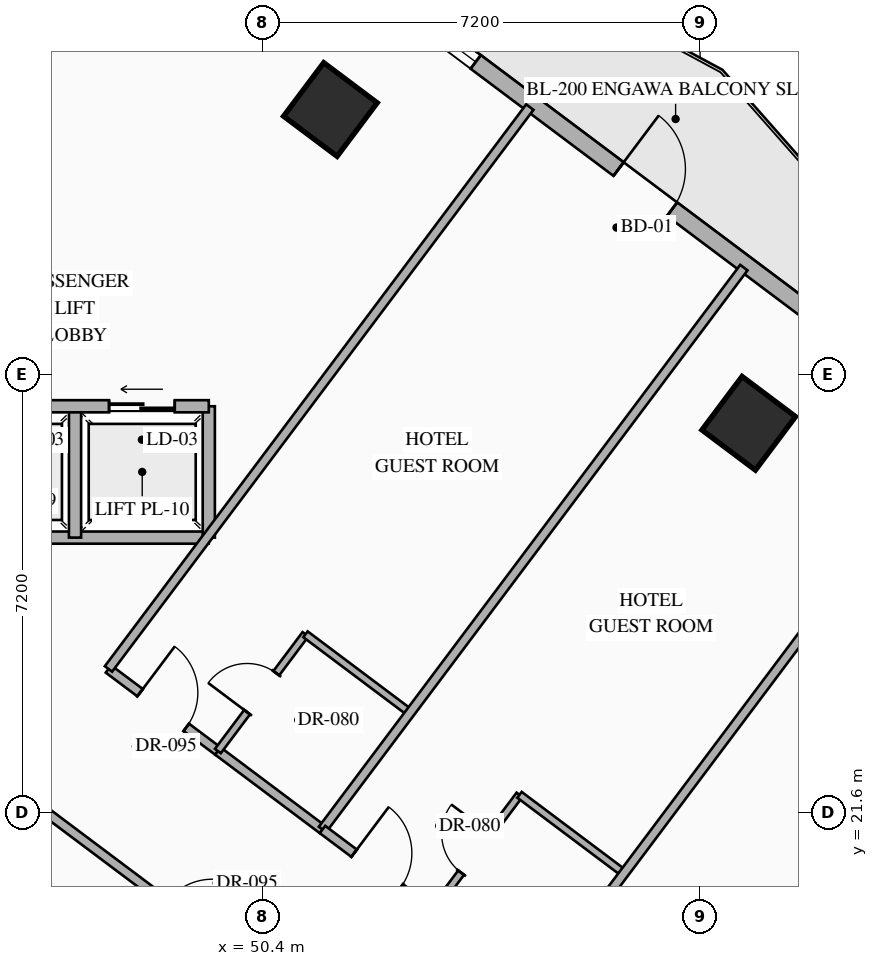
"""IFC4 building model, lengths in metres.
Left out: names, types, materials, properties, quantities, classifications, styles, units other than length and angle.
Written with IfcOpenShell. Run it as: python <this file> out.ifc"""

import sys

from ifc_helpers import new_model, si_unit, direction, frame, frame_2d, origin, origin_2d, place, context, subcontext, project, spatial, rectangle, hollow_rectangle, extrude, element, fill, save


model = new_model("IFC4")
c1 = context("Model", 3, precision=1e-05, world=origin(), true_north=direction((0.0, 1.0)))
c2 = subcontext(c1, "Body", "Model", "MODEL_VIEW")
j1 = project(units=[si_unit("LENGTHUNIT", "METRE"), si_unit("PLANEANGLEUNIT", "RADIAN")], contexts=[c1])
p1 = place(None, origin())
s1 = spatial("IfcSite", under=j1, at=p1, CompositionType="ELEMENT")
p2 = place(p1, origin())
s2 = spatial("IfcBuilding", under=s1, at=p2, CompositionType="ELEMENT")
p3 = place(p2, frame((0.0, 0.0, 60.05)))
s3 = spatial("IfcBuildingStorey", under=s2, at=p3, CompositionType="ELEMENT", Elevation=60.05)
for number, where, z_axis, x_axis in (
    (1, (51.52, 33.16, 0.0), (0.0, 0.0, 1.0), (0.8, -0.6, 0.0)),
    (2, (58.4, 28.0, 0.0), (0.0, 0.0, 1.0), (0.8, -0.6, 0.0)),
):
    element("IfcColumn", number, at=place(p3, frame(where, z_axis=z_axis, x_axis=x_axis)), inside=s3, PredefinedType="COLUMN", context=c2, shape_type="SweptSolid", body=[
        extrude(hollow_rectangle(XDim=1.1, YDim=1.1, WallThickness=0.04, at=origin_2d()), origin(), (0.0, 0.0, 1.0), 3.35),
    ])
p4 = place(p3, frame((44.86, 40.73, 0.0), z_axis=(0.0, 0.0, 1.0), x_axis=(0.800006902154, -0.599990797017, 0.0)))
e3 = element("IfcWall", 3, at=p4, inside=s3, PredefinedType="STANDARD", context=c2, shape_type="SweptSolid", body=[
    extrude(rectangle(XDim=29.712, YDim=0.28, at=frame_2d((14.856, 0.0))), origin(), (0.0, 0.0, 1.0), 3.13),
])
p5 = place(p4, frame((14.249, 0.0, 0.0)))
e4 = element("IfcOpeningElement", 4, at=p5, cuts=e3, PredefinedType="OPENING", context=c2, shape_type="SweptSolid", body=[
    extrude(rectangle(XDim=1.1, YDim=2.2, at=frame_2d((0.55, 1.1))), frame((0.0, 0.15, 0.0), z_axis=(0.0, -1.0, 0.0), x_axis=(1.0, 0.0, 0.0)), (0.0, 0.0, 1.0), 0.3),
])
p6 = place(p4, frame((1.612, 0.0, 0.85)))
e5 = element("IfcOpeningElement", 5, at=p6, cuts=e3, PredefinedType="OPENING", context=c2, shape_type="SweptSolid", body=[
    extrude(rectangle(XDim=1.4, YDim=1.8, at=frame_2d((0.7, 0.9))), frame((0.0, 0.15, 0.0), z_axis=(0.0, -1.0, 0.0), x_axis=(1.0, 0.0, 0.0)), (0.0, 0.0, 1.0), 0.3),
])
p7 = place(p4, frame((5.667, 0.0, 0.85)))
e6 = element("IfcOpeningElement", 6, at=p7, cuts=e3, PredefinedType="OPENING", context=c2, shape_type="SweptSolid", body=[
    extrude(rectangle(XDim=1.4, YDim=1.8, at=frame_2d((0.7, 0.9))), frame((0.0, 0.15, 0.0), z_axis=(0.0, -1.0, 0.0), x_axis=(1.0, 0.0, 0.0)), (0.0, 0.0, 1.0), 0.3),
])
p8 = place(p4, frame((9.912, 0.0, 0.85)))
e7 = element("IfcOpeningElement", 7, at=p8, cuts=e3, PredefinedType="OPENING", context=c2, shape_type="SweptSolid", body=[
    extrude(rectangle(XDim=1.4, YDim=1.8, at=frame_2d((0.7, 0.9))), frame((0.0, 0.15, 0.0), z_axis=(0.0, -1.0, 0.0), x_axis=(1.0, 0.0, 0.0)), (0.0, 0.0, 1.0), 0.3),
])
p9 = place(p4, frame((18.803, 0.0, 0.85)))
e8 = element("IfcOpeningElement", 8, at=p9, cuts=e3, PredefinedType="OPENING", context=c2, shape_type="SweptSolid", body=[
    extrude(rectangle(XDim=1.4, YDim=1.8, at=frame_2d((0.7, 0.9))), frame((0.0, 0.15, 0.0), z_axis=(0.0, -1.0, 0.0), x_axis=(1.0, 0.0, 0.0)), (0.0, 0.0, 1.0), 0.3),
])
p10 = place(p4, frame((22.645, 0.0, 0.85)))
e9 = element("IfcOpeningElement", 9, at=p10, cuts=e3, PredefinedType="OPENING", context=c2, shape_type="SweptSolid", body=[
    extrude(rectangle(XDim=1.4, YDim=1.8, at=frame_2d((0.7, 0.9))), frame((0.0, 0.15, 0.0), z_axis=(0.0, -1.0, 0.0), x_axis=(1.0, 0.0, 0.0)), (0.0, 0.0, 1.0), 0.3),
])
p11 = place(p4, frame((27.668, 0.0, 0.85)))
e10 = element("IfcOpeningElement", 10, at=p11, cuts=e3, PredefinedType="OPENING", context=c2, shape_type="SweptSolid", body=[
    extrude(rectangle(XDim=1.4, YDim=1.8, at=frame_2d((0.7, 0.9))), frame((0.0, 0.15, 0.0), z_axis=(0.0, -1.0, 0.0), x_axis=(1.0, 0.0, 0.0)), (0.0, 0.0, 1.0), 0.3),
])
p12 = place(p3, frame((53.318, 2.487, 0.0), z_axis=(0.0, 0.0, 1.0), x_axis=(-0.800004174678, 0.599994433723, 0.0)))
e11 = element("IfcWall", 11, at=p12, inside=s3, PredefinedType="STANDARD", context=c2, shape_type="SweptSolid", body=[
    extrude(rectangle(XDim=35.089, YDim=0.28, at=frame_2d((17.544, 0.0))), origin(), (0.0, 0.0, 1.0), 3.13),
])
p13 = place(p12, frame((1.931, 0.0, 0.85)))
e12 = element("IfcOpeningElement", 12, at=p13, cuts=e11, PredefinedType="OPENING", context=c2, shape_type="SweptSolid", body=[
    extrude(rectangle(XDim=1.4, YDim=1.8, at=frame_2d((0.7, 0.9))), frame((0.0, 0.15, 0.0), z_axis=(0.0, -1.0, 0.0), x_axis=(1.0, 0.0, 0.0)), (0.0, 0.0, 1.0), 0.3),
])
p14 = place(p12, frame((6.819, 0.0, 0.85)))
e13 = element("IfcOpeningElement", 13, at=p14, cuts=e11, PredefinedType="OPENING", context=c2, shape_type="SweptSolid", body=[
    extrude(rectangle(XDim=1.4, YDim=1.8, at=frame_2d((0.7, 0.9))), frame((0.0, 0.15, 0.0), z_axis=(0.0, -1.0, 0.0), x_axis=(1.0, 0.0, 0.0)), (0.0, 0.0, 1.0), 0.3),
])
p15 = place(p12, frame((11.832, 0.0, 0.85)))
e14 = element("IfcOpeningElement", 14, at=p15, cuts=e11, PredefinedType="OPENING", context=c2, shape_type="SweptSolid", body=[
    extrude(rectangle(XDim=1.4, YDim=1.8, at=frame_2d((0.7, 0.9))), frame((0.0, 0.15, 0.0), z_axis=(0.0, -1.0, 0.0), x_axis=(1.0, 0.0, 0.0)), (0.0, 0.0, 1.0), 0.3),
])
p16 = place(p12, frame((17.647, 0.0, 0.85)))
e15 = element("IfcOpeningElement", 15, at=p16, cuts=e11, PredefinedType="OPENING", context=c2, shape_type="SweptSolid", body=[
    extrude(rectangle(XDim=1.4, YDim=1.8, at=frame_2d((0.7, 0.9))), frame((0.0, 0.15, 0.0), z_axis=(0.0, -1.0, 0.0), x_axis=(1.0, 0.0, 0.0)), (0.0, 0.0, 1.0), 0.3),
])
p17 = place(p12, frame((21.857, 0.0, 0.85)))
e16 = element("IfcOpeningElement", 16, at=p17, cuts=e11, PredefinedType="OPENING", context=c2, shape_type="SweptSolid", body=[
    extrude(rectangle(XDim=1.4, YDim=1.8, at=frame_2d((0.7, 0.9))), frame((0.0, 0.15, 0.0), z_axis=(0.0, -1.0, 0.0), x_axis=(1.0, 0.0, 0.0)), (0.0, 0.0, 1.0), 0.3),
])
p18 = place(p12, frame((26.87, 0.0, 0.85)))
e17 = element("IfcOpeningElement", 17, at=p18, cuts=e11, PredefinedType="OPENING", context=c2, shape_type="SweptSolid", body=[
    extrude(rectangle(XDim=1.4, YDim=1.8, at=frame_2d((0.7, 0.9))), frame((0.0, 0.15, 0.0), z_axis=(0.0, -1.0, 0.0), x_axis=(1.0, 0.0, 0.0)), (0.0, 0.0, 1.0), 0.3),
])
p19 = place(p12, frame((31.757, 0.0, 0.85)))
e18 = element("IfcOpeningElement", 18, at=p19, cuts=e11, PredefinedType="OPENING", context=c2, shape_type="SweptSolid", body=[
    extrude(rectangle(XDim=1.4, YDim=1.8, at=frame_2d((0.7, 0.9))), frame((0.0, 0.15, 0.0), z_axis=(0.0, -1.0, 0.0), x_axis=(1.0, 0.0, 0.0)), (0.0, 0.0, 1.0), 0.3),
])
p20 = place(p3, frame((45.12, 26.12, 0.0), z_axis=(0.0, 0.0, 1.0), x_axis=(1.0, 0.0, 0.0)))
e19 = element("IfcWall", 19, at=p20, inside=s3, PredefinedType="STANDARD", context=c2, shape_type="SweptSolid", body=[
    extrude(rectangle(XDim=4.4, YDim=0.2, at=frame_2d((2.2, 0.0))), origin(), (0.0, 0.0, 1.0), 3.13),
])
for number, where, z_axis, x_axis in (
    (20, (49.52, 26.12, 0.0), (0.0, 0.0, 1.0), (0.0, 1.0, 0.0)),
    (21, (47.32, 26.12, 0.0), (0.0, 0.0, 1.0), (0.0, 1.0, 0.0)),
):
    element("IfcWall", number, at=place(p3, frame(where, z_axis=z_axis, x_axis=x_axis)), inside=s3, PredefinedType="STANDARD", context=c2, shape_type="SweptSolid", body=[
        extrude(rectangle(XDim=2.16, YDim=0.2, at=frame_2d((1.08, 0.0))), origin(), (0.0, 0.0, 1.0), 3.13),
    ])
p21 = place(p3, frame((45.12, 28.28, 0.0), z_axis=(0.0, 0.0, 1.0), x_axis=(1.0, 0.0, 0.0)))
e22 = element("IfcWall", 22, at=p21, inside=s3, PredefinedType="STANDARD", context=c2, shape_type="SweptSolid", body=[
    extrude(rectangle(XDim=4.4, YDim=0.2, at=frame_2d((2.2, 0.0))), origin(), (0.0, 0.0, 1.0), 3.13),
])
p22 = place(p21, frame((0.56, 0.0, 0.0)))
e23 = element("IfcOpeningElement", 23, at=p22, cuts=e22, PredefinedType="OPENING", context=c2, shape_type="SweptSolid", body=[
    extrude(rectangle(XDim=1.08, YDim=2.15, at=frame_2d((0.54, 1.075))), frame((0.0, 0.11, 0.0), z_axis=(0.0, -1.0, 0.0), x_axis=(1.0, 0.0, 0.0)), (0.0, 0.0, 1.0), 0.22),
])
p23 = place(p21, frame((2.76, 0.0, 0.0)))
e24 = element("IfcOpeningElement", 24, at=p23, cuts=e22, PredefinedType="OPENING", context=c2, shape_type="SweptSolid", body=[
    extrude(rectangle(XDim=1.08, YDim=2.15, at=frame_2d((0.54, 1.075))), frame((0.0, 0.11, 0.0), z_axis=(0.0, -1.0, 0.0), x_axis=(1.0, 0.0, 0.0)), (0.0, 0.0, 1.0), 0.22),
])
p24 = place(p3, frame((47.87, 23.96, 0.0), z_axis=(0.0, 0.0, 1.0), x_axis=(0.8, -0.6, 0.0)))
e25 = element("IfcWall", 25, at=p24, inside=s3, PredefinedType="PARTITIONING", context=c2, shape_type="SweptSolid", body=[
    extrude(rectangle(XDim=2.25, YDim=0.15, at=frame_2d((1.125, 0.0))), origin(), (0.0, 0.0, 1.0), 2.775),
])
p25 = place(p24, frame((0.65, 0.0, 0.0)))
e26 = element("IfcOpeningElement", 26, at=p25, cuts=e25, PredefinedType="OPENING", context=c2, shape_type="SweptSolid", body=[
    extrude(rectangle(XDim=0.95, YDim=2.15, at=frame_2d((0.475, 1.075))), frame((0.0, 0.085, 0.0), z_axis=(0.0, -1.0, 0.0), x_axis=(1.0, 0.0, 0.0)), (0.0, 0.0, 1.0), 0.17),
])
p26 = place(p3, frame((49.67, 22.61, 0.0), z_axis=(0.0, 0.0, 1.0), x_axis=(0.79998637334, -0.60001816845, 0.0)))
e27 = element("IfcWall", 27, at=p26, inside=s3, PredefinedType="PARTITIONING", context=c2, shape_type="SweptSolid", body=[
    extrude(rectangle(XDim=2.15, YDim=0.15, at=frame_2d((1.075, 0.0))), origin(), (0.0, 0.0, 1.0), 2.775),
])
p27 = place(p3, frame((49.67, 22.61, 0.0), z_axis=(0.0, 0.0, 1.0), x_axis=(0.600065100855, 0.79995117022, 0.0)))
e28 = element("IfcWall", 28, at=p27, inside=s3, PredefinedType="PARTITIONING", context=c2, shape_type="SweptSolid", body=[
    extrude(rectangle(XDim=2.4, YDim=0.12, at=frame_2d((1.2, 0.0))), origin(), (0.0, 0.0, 1.0), 3.13),
])
p28 = place(p27, frame((0.8, 0.0, 0.0)))
e29 = element("IfcOpeningElement", 29, at=p28, cuts=e28, PredefinedType="OPENING", context=c2, shape_type="SweptSolid", body=[
    extrude(rectangle(XDim=0.8, YDim=2.06, at=frame_2d((0.4, 1.03))), frame((0.0, 0.07, 0.0), z_axis=(0.0, -1.0, 0.0), x_axis=(1.0, 0.0, 0.0)), (0.0, 0.0, 1.0), 0.14),
])
p29 = place(p3, frame((51.11, 24.53, 0.0), z_axis=(0.0, 0.0, 1.0), x_axis=(0.79998637334, -0.60001816845, 0.0)))
e30 = element("IfcWall", 30, at=p29, inside=s3, PredefinedType="PARTITIONING", context=c2, shape_type="SweptSolid", body=[
    extrude(rectangle(XDim=2.15, YDim=0.12, at=frame_2d((1.075, 0.0))), origin(), (0.0, 0.0, 1.0), 3.13),
])
for number, where, z_axis, x_axis in (
    (31, (47.87, 23.96, 0.0), (0.0, 0.0, 1.0), (0.6, 0.8, 0.0)),
    (32, (51.39, 21.32, 0.0), (0.0, 0.0, 1.0), (0.6, 0.8, 0.0)),
):
    element("IfcWall", number, at=place(p3, frame(where, z_axis=z_axis, x_axis=x_axis)), inside=s3, PredefinedType="PARTITIONING", context=c2, shape_type="SweptSolid", body=[
        extrude(rectangle(XDim=11.55, YDim=0.15, at=frame_2d((5.775, 0.0))), origin(), (0.0, 0.0, 1.0), 3.13),
    ])
p30 = place(p3, frame((51.39, 21.32, 0.0), z_axis=(0.0, 0.0, 1.0), x_axis=(0.799986979543, -0.600017360216, 0.0)))
e33 = element("IfcWall", 33, at=p30, inside=s3, PredefinedType="PARTITIONING", context=c2, shape_type="SweptSolid", body=[
    extrude(rectangle(XDim=2.25, YDim=0.15, at=frame_2d((1.125, 0.0))), origin(), (0.0, 0.0, 1.0), 2.775),
])
p31 = place(p30, frame((0.65, 0.0, 0.0)))
e34 = element("IfcOpeningElement", 34, at=p31, cuts=e33, PredefinedType="OPENING", context=c2, shape_type="SweptSolid", body=[
    extrude(rectangle(XDim=0.95, YDim=2.15, at=frame_2d((0.475, 1.075))), frame((0.0, 0.085, 0.0), z_axis=(0.0, -1.0, 0.0), x_axis=(1.0, 0.0, 0.0)), (0.0, 0.0, 1.0), 0.17),
])
p32 = place(p3, frame((53.19, 19.97, 0.0), z_axis=(0.0, 0.0, 1.0), x_axis=(0.6, 0.8, 0.0)))
e35 = element("IfcWall", 35, at=p32, inside=s3, PredefinedType="PARTITIONING", context=c2, shape_type="SweptSolid", body=[
    extrude(rectangle(XDim=2.4, YDim=0.12, at=frame_2d((1.2, 0.0))), origin(), (0.0, 0.0, 1.0), 3.13),
])
p33 = place(p32, frame((0.8, 0.0, 0.0)))
e36 = element("IfcOpeningElement", 36, at=p33, cuts=e35, PredefinedType="OPENING", context=c2, shape_type="SweptSolid", body=[
    extrude(rectangle(XDim=0.8, YDim=2.06, at=frame_2d((0.4, 1.03))), frame((0.0, 0.07, 0.0), z_axis=(0.0, -1.0, 0.0), x_axis=(1.0, 0.0, 0.0)), (0.0, 0.0, 1.0), 0.14),
])
p34 = place(p3, frame((54.63, 21.89, 0.0), z_axis=(0.0, 0.0, 1.0), x_axis=(0.800081749437, -0.599890985279, 0.0)))
e37 = element("IfcWall", 37, at=p34, inside=s3, PredefinedType="PARTITIONING", context=c2, shape_type="SweptSolid", body=[
    extrude(rectangle(XDim=2.15, YDim=0.12, at=frame_2d((1.075, 0.0))), origin(), (0.0, 0.0, 1.0), 3.13),
])
for number, where, z_axis, x_axis in (
    (38, (54.91, 18.68, 0.0), (0.0, 0.0, 1.0), (0.6, 0.8, 0.0)),
    (39, (59.07, 15.56, 0.0), (0.0, 0.0, 1.0), (0.6, 0.8, 0.0)),
):
    element("IfcWall", number, at=place(p3, frame(where, z_axis=z_axis, x_axis=x_axis)), inside=s3, PredefinedType="PARTITIONING", context=c2, shape_type="SweptSolid", body=[
        extrude(rectangle(XDim=11.55, YDim=0.15, at=frame_2d((5.775, 0.0))), origin(), (0.0, 0.0, 1.0), 3.13),
    ])
p35 = place(p3, frame((46.37, 21.96, 0.0), z_axis=(0.0, 0.0, 1.0), x_axis=(0.799997249048, -0.600003667918, 0.0)))
e40 = element("IfcWall", 40, at=p35, inside=s3, PredefinedType="PARTITIONING", context=c2, shape_type="SweptSolid", body=[
    extrude(rectangle(XDim=10.65, YDim=0.15, at=frame_2d((5.325, 0.0))), origin(), (0.0, 0.0, 1.0), 2.425),
])
p36 = place(p35, frame((3.062, 0.0, 0.0)))
e41 = element("IfcOpeningElement", 41, at=p36, cuts=e40, PredefinedType="OPENING", context=c2, shape_type="SweptSolid", body=[
    extrude(rectangle(XDim=0.95, YDim=2.15, at=frame_2d((0.475, 1.075))), frame((0.0, 0.085, 0.0), z_axis=(0.0, -1.0, 0.0), x_axis=(1.0, 0.0, 0.0)), (0.0, 0.0, 1.0), 0.17),
])
p37 = place(p5, origin())
e42 = element("IfcDoor", 42, at=p37, inside=s3, OperationType="SINGLE_SWING_LEFT", PredefinedType="DOOR", context=c2, shape_type="SweptSolid", body=[
    extrude(rectangle(XDim=1.1, YDim=2.2, at=frame_2d((0.55, 1.1))), frame((0.0, 0.025, 0.0), z_axis=(0.0, -1.0, 0.0), x_axis=(1.0, 0.0, 0.0)), (0.0, 0.0, 1.0), 0.05),
])
fill(e4, e42)
p38 = place(p8, origin())
e43 = element("IfcWindow", 43, at=p38, inside=s3, PartitioningType="SINGLE_PANEL", PredefinedType="WINDOW", context=c2, shape_type="SweptSolid", body=[
    extrude(rectangle(XDim=1.4, YDim=1.8, at=frame_2d((0.7, 0.9))), frame((0.0, 0.03, 0.0), z_axis=(0.0, -1.0, 0.0), x_axis=(1.0, 0.0, 0.0)), (0.0, 0.0, 1.0), 0.06),
])
fill(e7, e43)
p39 = place(p23, origin())
e44 = element("IfcDoor", 44, at=p39, inside=s3, OperationType="SLIDING_TO_LEFT", PredefinedType="USERDEFINED", context=c2, shape_type="SweptSolid", body=[
    extrude(rectangle(XDim=1.08, YDim=2.15, at=frame_2d((0.54, 1.075))), frame((0.0, 0.025, 0.0), z_axis=(0.0, -1.0, 0.0), x_axis=(1.0, 0.0, 0.0)), (0.0, 0.0, 1.0), 0.05),
])
fill(e24, e44)
p40 = place(p25, origin())
e45 = element("IfcDoor", 45, at=p40, inside=s3, OperationType="SINGLE_SWING_LEFT", PredefinedType="DOOR", context=c2, shape_type="SweptSolid", body=[
    extrude(rectangle(XDim=0.95, YDim=2.15, at=frame_2d((0.475, 1.075))), frame((0.0, 0.025, 0.0), z_axis=(0.0, -1.0, 0.0), x_axis=(1.0, 0.0, 0.0)), (0.0, 0.0, 1.0), 0.05),
])
fill(e26, e45)
p41 = place(p28, origin())
e46 = element("IfcDoor", 46, at=p41, inside=s3, OperationType="SINGLE_SWING_LEFT", PredefinedType="DOOR", context=c2, shape_type="SweptSolid", body=[
    extrude(rectangle(XDim=0.8, YDim=2.06, at=frame_2d((0.4, 1.03))), frame((0.0, 0.025, 0.0), z_axis=(0.0, -1.0, 0.0), x_axis=(1.0, 0.0, 0.0)), (0.0, 0.0, 1.0), 0.05),
])
fill(e29, e46)
p42 = place(p31, origin())
e47 = element("IfcDoor", 47, at=p42, inside=s3, OperationType="SINGLE_SWING_LEFT", PredefinedType="DOOR", context=c2, shape_type="SweptSolid", body=[
    extrude(rectangle(XDim=0.95, YDim=2.15, at=frame_2d((0.475, 1.075))), frame((0.0, 0.025, 0.0), z_axis=(0.0, -1.0, 0.0), x_axis=(1.0, 0.0, 0.0)), (0.0, 0.0, 1.0), 0.05),
])
fill(e34, e47)
p43 = place(p33, origin())
e48 = element("IfcDoor", 48, at=p43, inside=s3, OperationType="SINGLE_SWING_RIGHT", PredefinedType="DOOR", context=c2, shape_type="SweptSolid", body=[
    extrude(rectangle(XDim=0.8, YDim=2.06, at=frame_2d((0.4, 1.03))), frame((0.0, 0.025, 0.0), z_axis=(0.0, -1.0, 0.0), x_axis=(1.0, 0.0, 0.0)), (0.0, 0.0, 1.0), 0.05),
])
fill(e36, e48)
save(model, sys.argv[1])
